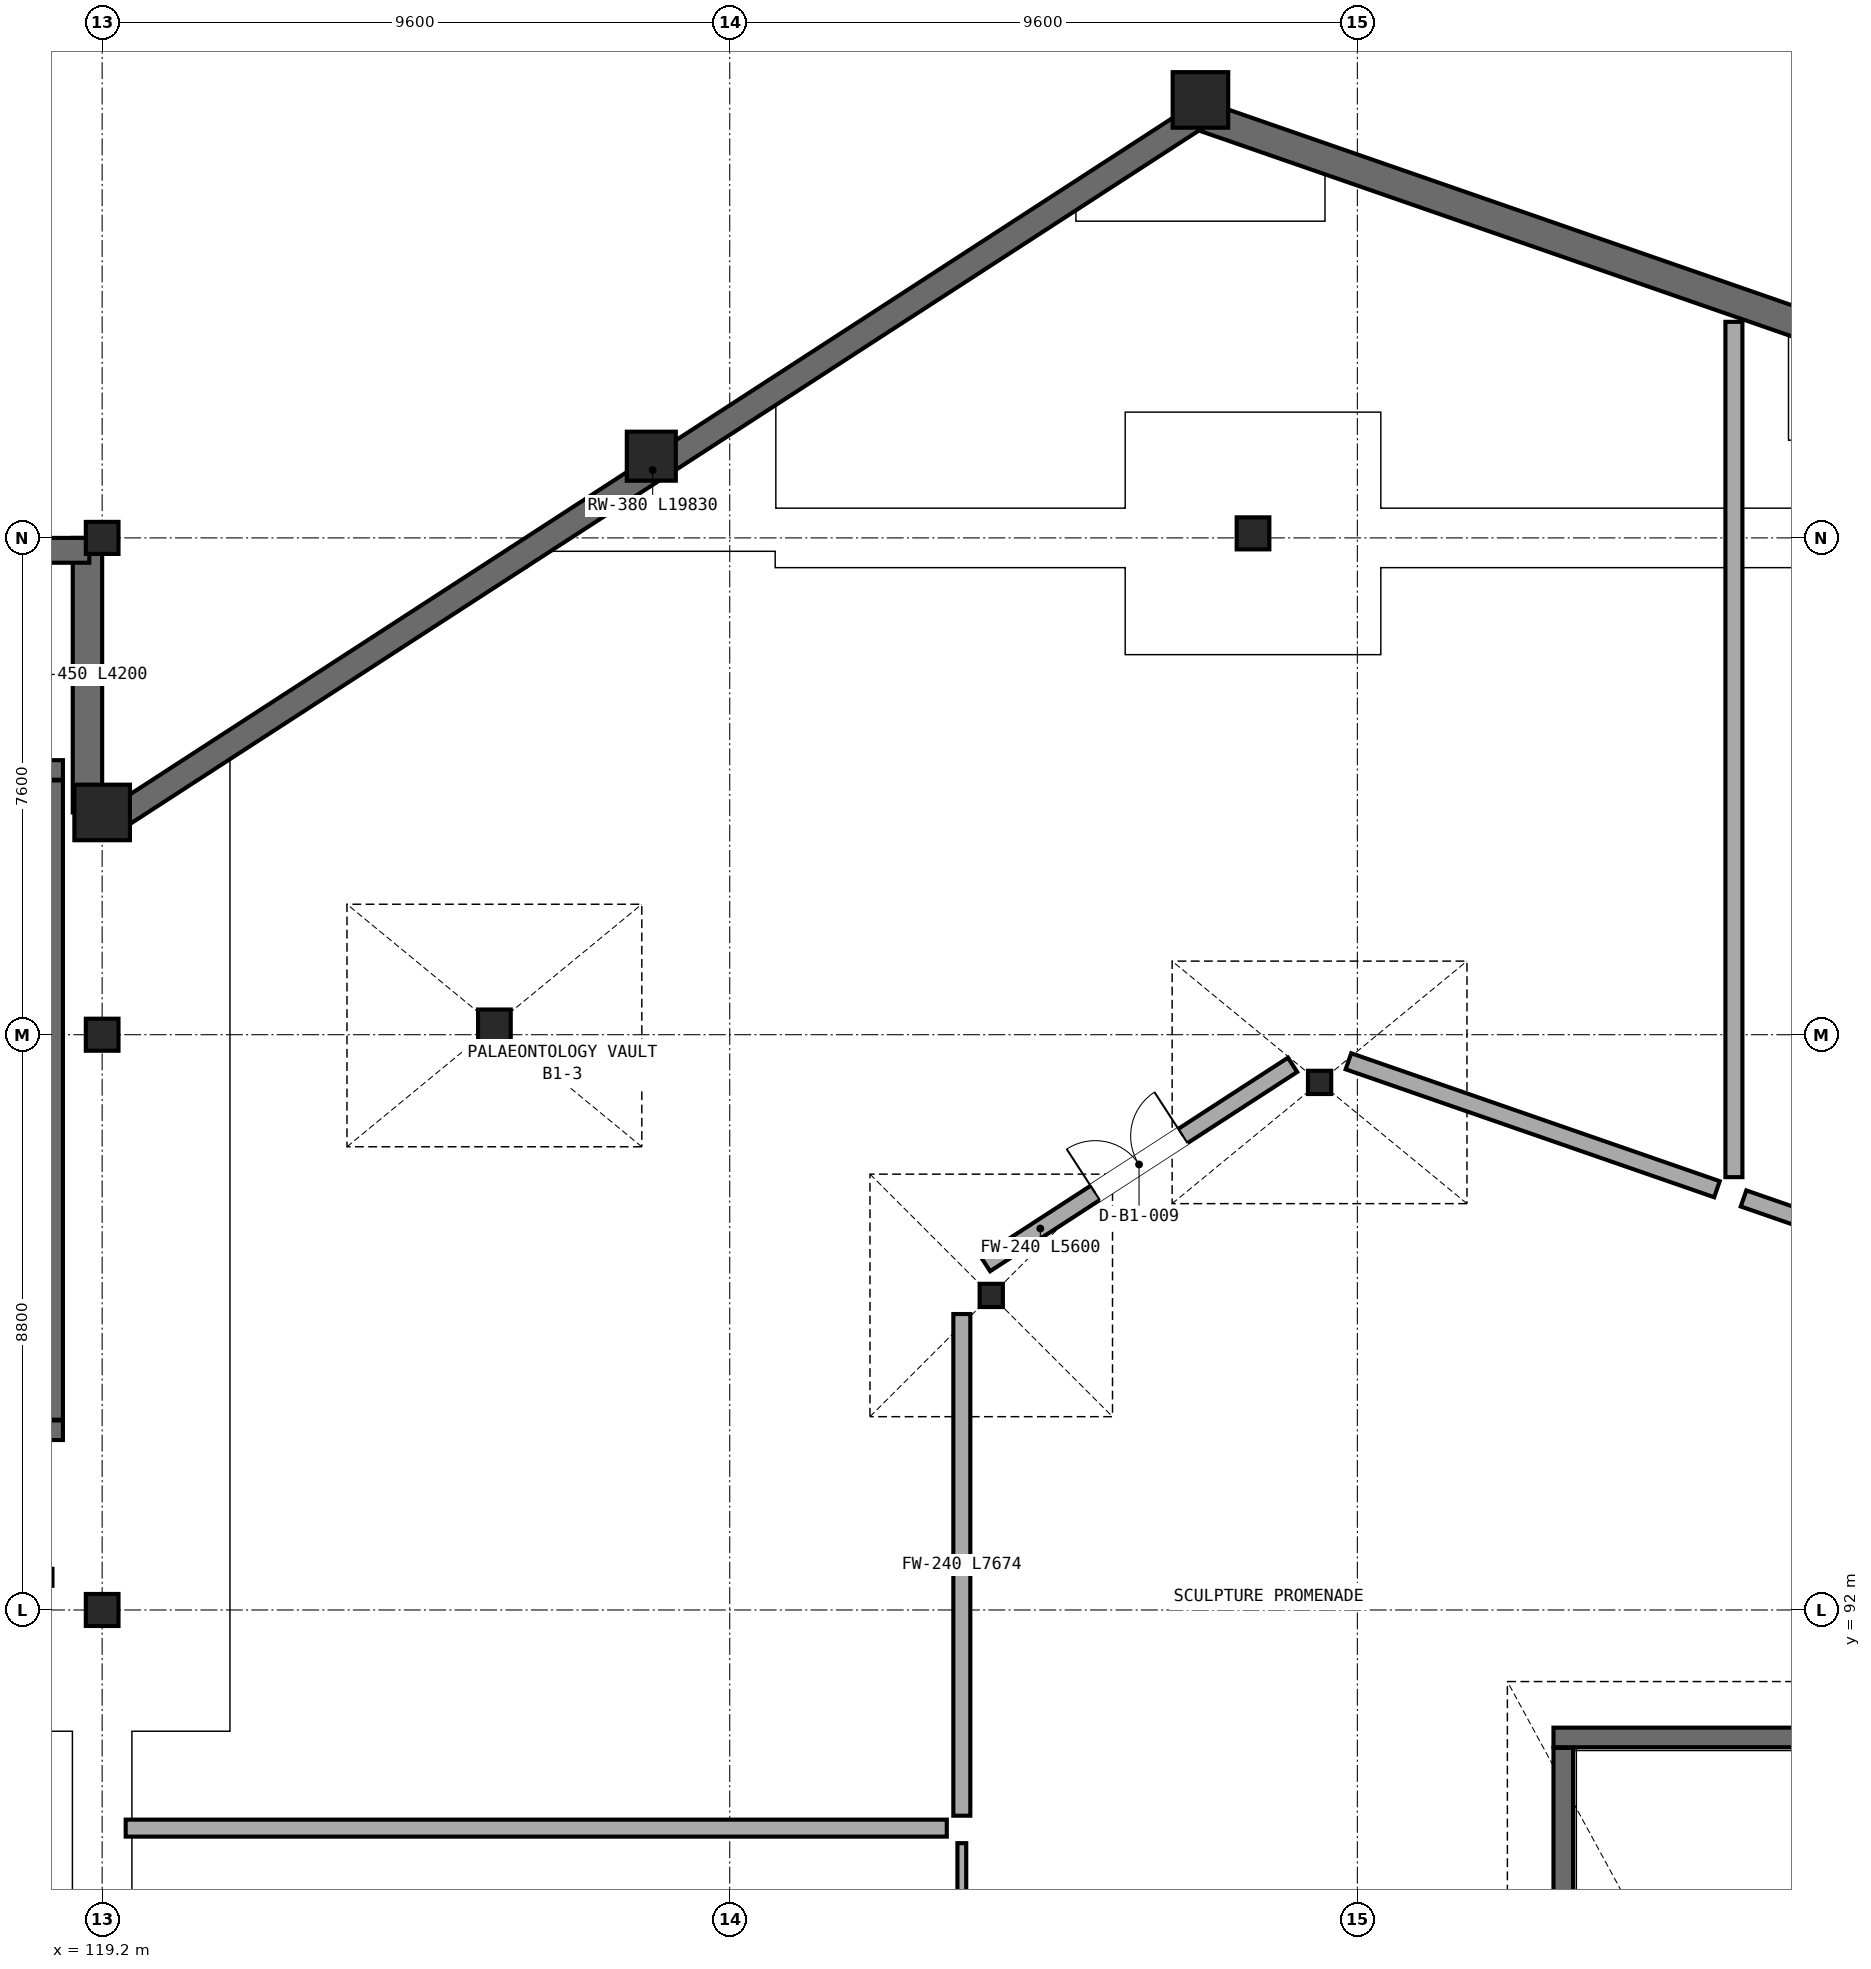
"""IFC4 building model, lengths in metres.
Left out: names, types, materials, properties, quantities, classifications, styles, units other than length and angle.
Written with IfcOpenShell. Run it as: python <this file> out.ifc"""

import sys

from ifc_helpers import new_model, si_unit, direction, frame, frame_2d, origin, origin_2d, place, context, subcontext, project, spatial, rectangle, hollow_circle, i_section, extrude, element, fill, save


model = new_model("IFC4")
c1 = context("Model", 3, precision=1e-05, world=origin(), true_north=direction((0.0, 1.0)))
c2 = subcontext(c1, "Body", "Model", "MODEL_VIEW")
j1 = project(units=[si_unit("LENGTHUNIT", "METRE"), si_unit("PLANEANGLEUNIT", "RADIAN")], contexts=[c1])
p1 = place(None, origin())
s1 = spatial("IfcSite", under=j1, at=p1, CompositionType="ELEMENT")
p2 = place(p1, origin())
s2 = spatial("IfcBuilding", under=s1, at=p2, CompositionType="ELEMENT")
p3 = place(p2, frame((0.0, 0.0, -5.4)))
s3 = spatial("IfcBuildingStorey", under=s2, at=p3, CompositionType="ELEMENT", Elevation=-5.4)
for number, where, z_axis, x_axis in (
    (1, (119.2, 92.0, 0.0), (0.0, 0.0, 1.0), (1.0, 0.0, 0.0)),
    (2, (119.2, 100.8, 0.0), (0.0, 0.0, 1.0), (1.0, 0.0, 0.0)),
    (3, (119.2, 108.4, 0.0), (0.0, 0.0, 1.0), (1.0, 0.0, 0.0)),
):
    element("IfcColumn", number, at=place(p3, frame(where, z_axis=z_axis, x_axis=x_axis)), inside=s3, PredefinedType="COLUMN", context=c2, shape_type="SweptSolid", body=[
        extrude(i_section(OverallWidth=0.5, OverallDepth=0.49, WebThickness=0.028, FlangeThickness=0.04, at=origin_2d()), origin(), (0.0, 0.0, 1.0), 5.4),
    ])
p4 = place(p3, frame((136.0, 115.1, 0.0), z_axis=(0.0, 0.0, 1.0), x_axis=(1.0, 0.0, 0.0)))
e4 = element("IfcColumn", 4, at=p4, inside=s3, PredefinedType="COLUMN", context=c2, shape_type="SweptSolid", body=[
    extrude(rectangle(XDim=0.85, YDim=0.85, at=origin_2d()), origin(), (0.0, 0.0, 1.0), 5.4),
])
p5 = place(p3, frame((127.6, 109.65, 0.0), z_axis=(0.0, 0.0, 1.0), x_axis=(1.0, 0.0, 0.0)))
e5 = element("IfcColumn", 5, at=p5, inside=s3, PredefinedType="COLUMN", context=c2, shape_type="SweptSolid", body=[
    extrude(rectangle(XDim=0.75, YDim=0.75, at=origin_2d()), origin(), (0.0, 0.0, 1.0), 5.4),
])
p6 = place(p3, frame((136.804, 108.469, 0.0), z_axis=(0.0, 0.0, 1.0), x_axis=(1.0, 0.0, 0.0)))
e6 = element("IfcColumn", 6, at=p6, inside=s3, PredefinedType="COLUMN", context=c2, shape_type="SweptSolid", body=[
    extrude(i_section(OverallWidth=0.5, OverallDepth=0.49, WebThickness=0.028, FlangeThickness=0.04, at=origin_2d()), origin(), (0.0, 0.0, 1.0), 5.4),
])
p7 = place(p3, frame((137.823, 100.071, 0.0), z_axis=(0.0, 0.0, 1.0), x_axis=(1.0, 0.0, 0.0)))
e7 = element("IfcColumn", 7, at=p7, inside=s3, PredefinedType="COLUMN", context=c2, shape_type="SweptSolid", body=[
    extrude(hollow_circle(Radius=0.178, WallThickness=0.013, at=origin_2d()), origin(), (0.0, 0.0, 1.0), 5.4),
])
p8 = place(p3, frame((119.2, 104.2, 0.0), z_axis=(0.0, 0.0, 1.0), x_axis=(1.0, 0.0, 0.0)))
e8 = element("IfcColumn", 8, at=p8, inside=s3, PredefinedType="COLUMN", context=c2, shape_type="SweptSolid", body=[
    extrude(rectangle(XDim=0.85, YDim=0.85, at=origin_2d()), origin(), (0.0, 0.0, 1.0), 5.4),
])
p9 = place(p3, frame((125.2, 100.941, 0.0), z_axis=(0.0, 0.0, 1.0), x_axis=(1.0, 0.0, 0.0)))
e9 = element("IfcColumn", 9, at=p9, inside=s3, PredefinedType="COLUMN", context=c2, shape_type="SweptSolid", body=[
    extrude(i_section(OverallWidth=0.5, OverallDepth=0.49, WebThickness=0.028, FlangeThickness=0.04, at=origin_2d()), origin(), (0.0, 0.0, 1.0), 5.4),
])
p10 = place(p3, frame((132.8, 96.812, 0.0), z_axis=(0.0, 0.0, 1.0), x_axis=(1.0, 0.0, 0.0)))
e10 = element("IfcColumn", 10, at=p10, inside=s3, PredefinedType="COLUMN", context=c2, shape_type="SweptSolid", body=[
    extrude(hollow_circle(Radius=0.178, WallThickness=0.013, at=origin_2d()), origin(), (0.0, 0.0, 1.0), 5.4),
])
p11 = place(p3, frame((157.308, 107.463, 0.0), z_axis=(0.0, 0.0, 1.0), x_axis=(-0.94467273581, 0.328014362822, 0.0)))
e11 = element("IfcWall", 11, at=p11, inside=s3, PredefinedType="USERDEFINED", context=c2, shape_type="SweptSolid", body=[
    extrude(rectangle(XDim=22.634, YDim=0.45, at=frame_2d((11.317, 0.0))), origin(), (0.0, 0.0, 1.0), 5.06),
])
p12 = place(p3, frame((135.939, 114.834, 0.0), z_axis=(0.0, 0.0, 1.0), x_axis=(-0.838895349303, -0.544292745604, 0.0)))
e12 = element("IfcWall", 12, at=p12, inside=s3, PredefinedType="USERDEFINED", context=c2, shape_type="SweptSolid", body=[
    extrude(rectangle(XDim=19.83, YDim=0.38, at=frame_2d((9.915, 0.0))), origin(), (0.0, 0.0, 1.0), 5.06),
])
p13 = place(p3, frame((118.975, 104.2, 0.0), z_axis=(0.0, 0.0, 1.0), x_axis=(0.0, 1.0, 0.0)))
e13 = element("IfcWall", 13, at=p13, inside=s3, PredefinedType="USERDEFINED", context=c2, shape_type="SweptSolid", body=[
    extrude(rectangle(XDim=4.2, YDim=0.45, at=frame_2d((2.1, 0.0))), origin(), (0.0, 0.0, 1.0), 5.06),
])
p14 = place(p3, frame((119.004, 108.21, 0.0), z_axis=(0.0, 0.0, 1.0), x_axis=(-1.0, 0.0, 0.0)))
e14 = element("IfcWall", 14, at=p14, inside=s3, PredefinedType="USERDEFINED", context=c2, shape_type="SweptSolid", body=[
    extrude(rectangle(XDim=38.204, YDim=0.38, at=frame_2d((19.102, 0.0))), origin(), (0.0, 0.0, 1.0), 5.06),
])
p15 = place(p3, frame((110.2, 94.75, 0.0), z_axis=(0.0, 0.0, 1.0), x_axis=(1.0, 0.0, 0.0)))
e15 = element("IfcWall", 15, at=p15, inside=s3, PredefinedType="SHEAR", context=c2, shape_type="SweptSolid", body=[
    extrude(rectangle(XDim=8.4, YDim=0.3, at=frame_2d((4.2, 0.0))), origin(), (0.0, 0.0, 1.0), 5.095),
])
p16 = place(p15, frame((5.925, 0.0, 0.0)))
e16 = element("IfcOpeningElement", 16, at=p16, cuts=e15, PredefinedType="OPENING", context=c2, shape_type="SweptSolid", body=[
    extrude(rectangle(XDim=1.45, YDim=2.25, at=frame_2d((0.725, 1.125))), frame((0.0, 0.16, 0.0), z_axis=(0.0, -1.0, 0.0), x_axis=(1.0, 0.0, 0.0)), (0.0, 0.0, 1.0), 0.32),
])
p17 = place(p3, frame((118.6, 104.85, 0.0), z_axis=(0.0, 0.0, 1.0), x_axis=(-1.0, 0.0, 0.0)))
e17 = element("IfcWall", 17, at=p17, inside=s3, PredefinedType="SHEAR", context=c2, shape_type="SweptSolid", body=[
    extrude(rectangle(XDim=8.4, YDim=0.3, at=frame_2d((4.2, 0.0))), origin(), (0.0, 0.0, 1.0), 5.095),
])
p18 = place(p3, frame((118.45, 94.91, 0.0), z_axis=(0.0, 0.0, 1.0), x_axis=(0.0, 1.0, 0.0)))
e18 = element("IfcWall", 18, at=p18, inside=s3, PredefinedType="SHEAR", context=c2, shape_type="SweptSolid", body=[
    extrude(rectangle(XDim=9.78, YDim=0.3, at=frame_2d((4.89, 0.0))), origin(), (0.0, 0.0, 1.0), 5.095),
])
p19 = place(p3, frame((146.2, 90.05, 0.0), z_axis=(0.0, 0.0, 1.0), x_axis=(-1.0, 0.0, 0.0)))
e19 = element("IfcWall", 19, at=p19, inside=s3, PredefinedType="SHEAR", context=c2, shape_type="SweptSolid", body=[
    extrude(rectangle(XDim=4.8, YDim=0.3, at=frame_2d((2.4, 0.0))), origin(), (0.0, 0.0, 1.0), 5.085),
])
p20 = place(p3, frame((141.55, 89.89, 0.0), z_axis=(0.0, 0.0, 1.0), x_axis=(0.0, -1.0, 0.0)))
e20 = element("IfcWall", 20, at=p20, inside=s3, PredefinedType="SHEAR", context=c2, shape_type="SweptSolid", body=[
    extrude(rectangle(XDim=9.38, YDim=0.3, at=frame_2d((4.69, 0.0))), origin(), (0.0, 0.0, 1.0), 5.085),
])
p21 = place(p3, frame((132.35, 88.433, 0.0), z_axis=(0.0, 0.0, 1.0), x_axis=(0.0, -1.0, 0.0)))
e21 = element("IfcWall", 21, at=p21, inside=s3, PredefinedType="PARTITIONING", context=c2, shape_type="SweptSolid", body=[
    extrude(rectangle(XDim=8.553, YDim=0.135, at=frame_2d((4.276, 0.0))), origin(), (0.0, 0.0, 1.0), 5.03),
])
p22 = place(p3, frame((137.409, 100.339, 0.0), z_axis=(0.0, 0.0, 1.0), x_axis=(-0.838914477988, -0.544263262238, 0.0)))
e22 = element("IfcWall", 22, at=p22, inside=s3, PredefinedType="SOLIDWALL", context=c2, shape_type="SweptSolid", body=[
    extrude(rectangle(XDim=5.6, YDim=0.26, at=frame_2d((2.8, 0.0))), origin(), (0.0, 0.0, 1.0), 5.03),
])
p23 = place(p22, frame((2.0, 0.0, 0.0)))
e23 = element("IfcOpeningElement", 23, at=p23, cuts=e22, PredefinedType="OPENING", context=c2, shape_type="SweptSolid", body=[
    extrude(rectangle(XDim=1.6, YDim=2.4, at=frame_2d((0.8, 1.2))), frame((0.0, 0.14, 0.0), z_axis=(0.0, -1.0, 0.0), x_axis=(1.0, 0.0, 0.0)), (0.0, 0.0, 1.0), 0.28),
])
p24 = place(p3, frame((132.35, 96.527, 0.0), z_axis=(0.0, 0.0, 1.0), x_axis=(0.0, -1.0, 0.0)))
e24 = element("IfcWall", 24, at=p24, inside=s3, PredefinedType="SOLIDWALL", context=c2, shape_type="SweptSolid", body=[
    extrude(rectangle(XDim=7.675, YDim=0.26, at=frame_2d((3.837, 0.0))), origin(), (0.0, 0.0, 1.0), 5.03),
])
p25 = place(p3, frame((143.901, 98.437, 0.0), z_axis=(0.0, 0.0, 1.0), x_axis=(-0.944669438021, 0.328023860214, 0.0)))
e25 = element("IfcWall", 25, at=p25, inside=s3, PredefinedType="SOLIDWALL", context=c2, shape_type="SweptSolid", body=[
    extrude(rectangle(XDim=5.967, YDim=0.26, at=frame_2d((2.983, 0.0))), origin(), (0.0, 0.0, 1.0), 5.03),
])
p26 = place(p3, frame((148.309, 96.906, 0.0), z_axis=(0.0, 0.0, 1.0), x_axis=(-0.944667711612, 0.328028832022, 0.0)))
e26 = element("IfcWall", 26, at=p26, inside=s3, PredefinedType="SOLIDWALL", context=c2, shape_type="SweptSolid", body=[
    extrude(rectangle(XDim=4.236, YDim=0.26, at=frame_2d((2.118, 0.0))), origin(), (0.0, 0.0, 1.0), 5.03),
])
p27 = place(p26, frame((1.318, 0.0, 0.0)))
e27 = element("IfcOpeningElement", 27, at=p27, cuts=e26, PredefinedType="OPENING", context=c2, shape_type="SweptSolid", body=[
    extrude(rectangle(XDim=1.6, YDim=2.4, at=frame_2d((0.8, 1.2))), frame((0.0, 0.14, 0.0), z_axis=(0.0, -1.0, 0.0), x_axis=(1.0, 0.0, 0.0)), (0.0, 0.0, 1.0), 0.28),
])
p28 = place(p3, frame((119.56, 88.663, 0.0), z_axis=(0.0, 0.0, 1.0), x_axis=(1.0, 0.0, 0.0)))
e28 = element("IfcWall", 28, at=p28, inside=s3, PredefinedType="SOLIDWALL", context=c2, shape_type="SweptSolid", body=[
    extrude(rectangle(XDim=12.56, YDim=0.26, at=frame_2d((6.28, 0.0))), origin(), (0.0, 0.0, 1.0), 4.36),
])
p29 = place(p3, frame((144.16, 111.706, 0.0), z_axis=(0.0, 0.0, 1.0), x_axis=(0.0, -1.0, 0.0)))
e29 = element("IfcWall", 29, at=p29, inside=s3, PredefinedType="SOLIDWALL", context=c2, shape_type="SweptSolid", body=[
    extrude(rectangle(XDim=13.084, YDim=0.26, at=frame_2d((6.542, 0.0))), origin(), (0.0, 0.0, 1.0), 4.36),
])
p30 = place(p23, frame((1.6, 0.0, 0.0), z_axis=(0.0, 0.0, 1.0), x_axis=(-1.0, 0.0, 0.0)))
e30 = element("IfcDoor", 30, at=p30, inside=s3, OperationType="DOUBLE_DOOR_SINGLE_SWING", PredefinedType="DOOR", context=c2, shape_type="SweptSolid", body=[
    extrude(rectangle(XDim=1.6, YDim=2.4, at=frame_2d((0.8, 1.2))), frame((0.0, 0.025, 0.0), z_axis=(0.0, -1.0, 0.0), x_axis=(1.0, 0.0, 0.0)), (0.0, 0.0, 1.0), 0.05),
])
fill(e23, e30)
save(model, sys.argv[1])
